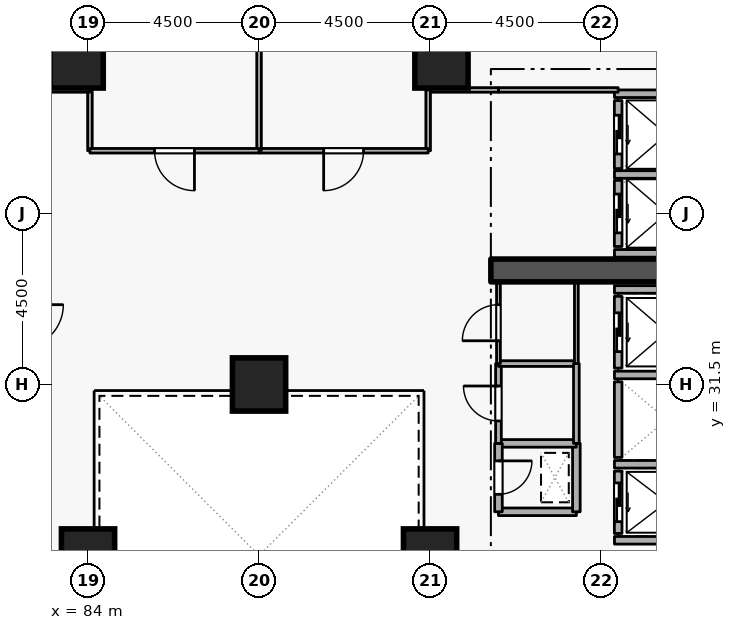
"""IFC4 building model, lengths in metres.
Left out: names, types, materials, properties, quantities, classifications, styles, units other than length and angle.
Written with IfcOpenShell. Run it as: python <this file> out.ifc"""

import sys

from ifc_helpers import new_model, si_unit, direction, frame, frame_2d, origin, origin_2d, place, context, subcontext, project, spatial, rectangle, extrude, element, fill, save


model = new_model("IFC4")
c1 = context("Model", 3, precision=1e-05, world=origin(), true_north=direction((0.0, 1.0)))
c2 = subcontext(c1, "Body", "Model", "MODEL_VIEW")
j1 = project(units=[si_unit("LENGTHUNIT", "METRE"), si_unit("PLANEANGLEUNIT", "RADIAN")], contexts=[c1])
p1 = place(None, origin())
s1 = spatial("IfcSite", under=j1, at=p1, CompositionType="ELEMENT")
p2 = place(p1, origin())
s2 = spatial("IfcBuilding", under=s1, at=p2, CompositionType="ELEMENT")
p3 = place(p2, frame((0.0, 0.0, 35.1)))
s3 = spatial("IfcBuildingStorey", under=s2, at=p3, CompositionType="ELEMENT", Elevation=35.1)
p4 = place(p3, frame((94.6, 34.5, 0.0), z_axis=(0.0, 0.0, 1.0), x_axis=(1.0, 0.0, 0.0)))
e1 = element("IfcWall", 1, at=p4, inside=s3, PredefinedType="SHEAR", context=c2, shape_type="SweptSolid", body=[
    extrude(rectangle(XDim=5.7, YDim=0.6, at=frame_2d((2.85, 0.0))), origin(), (0.0, 0.0, 1.0), 3.6),
])
for number, where, z_axis, x_axis in (
    (2, (93.3, 40.0, 0.0), (0.0, 0.0, 1.0), (1.0, 0.0, 0.0)),
    (3, (83.7, 40.0, 0.0), (0.0, 0.0, 1.0), (1.0, 0.0, 0.0)),
    (4, (93.0, 27.0, 0.0), (0.0, 0.0, 1.0), (1.0, 0.0, 0.0)),
    (5, (84.0, 27.0, 0.0), (0.0, 0.0, 1.0), (1.0, 0.0, 0.0)),
    (6, (88.5, 31.5, 0.0), (0.0, 0.0, 1.0), (1.0, 0.0, 0.0)),
):
    element("IfcColumn", number, at=place(p3, frame(where, z_axis=z_axis, x_axis=x_axis)), inside=s3, PredefinedType="COLUMN", context=c2, shape_type="SweptSolid", body=[
        extrude(rectangle(XDim=1.4, YDim=1.4, at=origin_2d()), origin(), (0.0, 0.0, 1.0), 3.6),
    ])
p5 = place(p3, frame((97.95, 29.22, 0.0), z_axis=(0.0, 0.0, 1.0), x_axis=(0.0, -1.0, 0.0)))
e7 = element("IfcWall", 7, at=p5, inside=s3, PredefinedType="STANDARD", context=c2, shape_type="SweptSolid", body=[
    extrude(rectangle(XDim=1.64, YDim=0.2, at=frame_2d((0.82, 0.0))), origin(), (0.0, 0.0, 1.0), 3.34),
])
p6 = place(p5, frame((0.31, 0.0, 0.0)))
e8 = element("IfcOpeningElement", 8, at=p6, cuts=e7, PredefinedType="OPENING", context=c2, shape_type="SweptSolid", body=[
    extrude(rectangle(XDim=1.02, YDim=2.06, at=frame_2d((0.51, 1.03))), frame((0.0, 0.11, 0.0), z_axis=(0.0, -1.0, 0.0), x_axis=(1.0, 0.0, 0.0)), (0.0, 0.0, 1.0), 0.22),
])
p7 = place(p3, frame((97.95, 31.57, 0.0), z_axis=(0.0, 0.0, 1.0), x_axis=(0.0, -1.0, 0.0)))
e9 = element("IfcWall", 9, at=p7, inside=s3, PredefinedType="STANDARD", context=c2, shape_type="SweptSolid", body=[
    extrude(rectangle(XDim=1.99, YDim=0.2, at=frame_2d((0.995, 0.0))), origin(), (0.0, 0.0, 1.0), 3.34),
])
p8 = place(p3, frame((97.95, 33.82, 0.0), z_axis=(0.0, 0.0, 1.0), x_axis=(0.0, -1.0, 0.0)))
e10 = element("IfcWall", 10, at=p8, inside=s3, PredefinedType="STANDARD", context=c2, shape_type="SweptSolid", body=[
    extrude(rectangle(XDim=1.89, YDim=0.2, at=frame_2d((0.945, 0.0))), origin(), (0.0, 0.0, 1.0), 3.34),
])
p9 = place(p8, frame((0.435, 0.0, 0.0)))
e11 = element("IfcOpeningElement", 11, at=p9, cuts=e10, PredefinedType="OPENING", context=c2, shape_type="SweptSolid", body=[
    extrude(rectangle(XDim=1.02, YDim=2.06, at=frame_2d((0.51, 1.03))), frame((0.0, 0.11, 0.0), z_axis=(0.0, -1.0, 0.0), x_axis=(1.0, 0.0, 0.0)), (0.0, 0.0, 1.0), 0.22),
])
p10 = place(p3, frame((97.95, 36.87, 0.0), z_axis=(0.0, 0.0, 1.0), x_axis=(0.0, -1.0, 0.0)))
e12 = element("IfcWall", 12, at=p10, inside=s3, PredefinedType="STANDARD", context=c2, shape_type="SweptSolid", body=[
    extrude(rectangle(XDim=1.74, YDim=0.2, at=frame_2d((0.87, 0.0))), origin(), (0.0, 0.0, 1.0), 3.34),
])
p11 = place(p10, frame((0.36, 0.0, 0.0)))
e13 = element("IfcOpeningElement", 13, at=p11, cuts=e12, PredefinedType="OPENING", context=c2, shape_type="SweptSolid", body=[
    extrude(rectangle(XDim=1.02, YDim=2.06, at=frame_2d((0.51, 1.03))), frame((0.0, 0.11, 0.0), z_axis=(0.0, -1.0, 0.0), x_axis=(1.0, 0.0, 0.0)), (0.0, 0.0, 1.0), 0.22),
])
p12 = place(p3, frame((97.95, 38.97, 0.0), z_axis=(0.0, 0.0, 1.0), x_axis=(0.0, -1.0, 0.0)))
e14 = element("IfcWall", 14, at=p12, inside=s3, PredefinedType="STANDARD", context=c2, shape_type="SweptSolid", body=[
    extrude(rectangle(XDim=1.79, YDim=0.2, at=frame_2d((0.895, 0.0))), origin(), (0.0, 0.0, 1.0), 3.34),
])
p13 = place(p12, frame((0.385, 0.0, 0.0)))
e15 = element("IfcOpeningElement", 15, at=p13, cuts=e14, PredefinedType="OPENING", context=c2, shape_type="SweptSolid", body=[
    extrude(rectangle(XDim=1.02, YDim=2.06, at=frame_2d((0.51, 1.03))), frame((0.0, 0.11, 0.0), z_axis=(0.0, -1.0, 0.0), x_axis=(1.0, 0.0, 0.0)), (0.0, 0.0, 1.0), 0.22),
])
for number, where, z_axis, x_axis in (
    (16, (97.852, 29.4, 0.0), (0.0, 0.0, 1.0), (1.0, 0.0, 0.0)),
    (17, (97.852, 27.4, 0.0), (0.0, 0.0, 1.0), (1.0, 0.0, 0.0)),
    (18, (97.852, 31.75, 0.0), (0.0, 0.0, 1.0), (1.0, 0.0, 0.0)),
    (19, (97.852, 34.0, 0.0), (0.0, 0.0, 1.0), (1.0, 0.0, 0.0)),
):
    element("IfcWall", number, at=place(p3, frame(where, z_axis=z_axis, x_axis=x_axis)), inside=s3, PredefinedType="STANDARD", context=c2, shape_type="SweptSolid", body=[
        extrude(rectangle(XDim=2.436, YDim=0.2, at=frame_2d((1.218, 0.0))), origin(), (0.0, 0.0, 1.0), 3.34),
    ])
for number, where, z_axis, x_axis in (
    (20, (97.852, 37.025, 0.0), (0.0, 0.0, 1.0), (1.0, 0.0, 0.0)),
    (21, (97.852, 34.95, 0.0), (0.0, 0.0, 1.0), (1.0, 0.0, 0.0)),
):
    element("IfcWall", number, at=place(p3, frame(where, z_axis=z_axis, x_axis=x_axis)), inside=s3, PredefinedType="STANDARD", context=c2, shape_type="SweptSolid", body=[
        extrude(rectangle(XDim=2.746, YDim=0.2, at=frame_2d((1.373, 0.0))), origin(), (0.0, 0.0, 1.0), 3.34),
    ])
p14 = place(p3, frame((97.852, 39.15, 0.0), z_axis=(0.0, 0.0, 1.0), x_axis=(1.0, 0.0, 0.0)))
e22 = element("IfcWall", 22, at=p14, inside=s3, PredefinedType="STANDARD", context=c2, shape_type="SweptSolid", body=[
    extrude(rectangle(XDim=2.636, YDim=0.2, at=frame_2d((1.318, 0.0))), origin(), (0.0, 0.0, 1.0), 3.34),
])
p15 = place(p3, frame((94.8, 28.15, 0.0), z_axis=(0.0, 0.0, 1.0), x_axis=(1.0, 0.0, 0.0)))
e23 = element("IfcWall", 23, at=p15, inside=s3, PredefinedType="STANDARD", context=c2, shape_type="SweptSolid", body=[
    extrude(rectangle(XDim=2.05, YDim=0.2, at=frame_2d((1.025, 0.0))), origin(), (0.0, 0.0, 1.0), 3.34),
])
p16 = place(p3, frame((96.85, 28.15, 0.0), z_axis=(0.0, 0.0, 1.0), x_axis=(0.0, 1.0, 0.0)))
e24 = element("IfcWall", 24, at=p16, inside=s3, PredefinedType="STANDARD", context=c2, shape_type="SweptSolid", body=[
    extrude(rectangle(XDim=1.8, YDim=0.2, at=frame_2d((0.9, 0.0))), origin(), (0.0, 0.0, 1.0), 3.34),
])
p17 = place(p3, frame((96.85, 29.95, 0.0), z_axis=(0.0, 0.0, 1.0), x_axis=(-1.0, 0.0, 0.0)))
e25 = element("IfcWall", 25, at=p17, inside=s3, PredefinedType="STANDARD", context=c2, shape_type="SweptSolid", body=[
    extrude(rectangle(XDim=2.05, YDim=0.2, at=frame_2d((1.025, 0.0))), origin(), (0.0, 0.0, 1.0), 3.34),
])
p18 = place(p3, frame((94.8, 29.95, 0.0), z_axis=(0.0, 0.0, 1.0), x_axis=(0.0, -1.0, 0.0)))
e26 = element("IfcWall", 26, at=p18, inside=s3, PredefinedType="STANDARD", context=c2, shape_type="SweptSolid", body=[
    extrude(rectangle(XDim=1.8, YDim=0.2, at=frame_2d((0.9, 0.0))), origin(), (0.0, 0.0, 1.0), 3.34),
])
p19 = place(p18, frame((0.46, 0.0, 0.0)))
e27 = element("IfcOpeningElement", 27, at=p19, cuts=e26, PredefinedType="OPENING", context=c2, shape_type="SweptSolid", body=[
    extrude(rectangle(XDim=0.88, YDim=2.04, at=frame_2d((0.44, 1.02))), frame((0.0, 0.11, 0.0), z_axis=(0.0, -1.0, 0.0), x_axis=(1.0, 0.0, 0.0)), (0.0, 0.0, 1.0), 0.22),
])
p20 = place(p3, frame((94.8, 29.95, 0.0), z_axis=(0.0, 0.0, 1.0), x_axis=(0.0, 1.0, 0.0)))
e28 = element("IfcWall", 28, at=p20, inside=s3, PredefinedType="PARTITIONING", context=c2, shape_type="SweptSolid", body=[
    extrude(rectangle(XDim=2.1, YDim=0.15, at=frame_2d((1.05, 0.0))), origin(), (0.0, 0.0, 1.0), 3.34),
])
p21 = place(p20, frame((0.59, 0.0, 0.0)))
e29 = element("IfcOpeningElement", 29, at=p21, cuts=e28, PredefinedType="OPENING", context=c2, shape_type="SweptSolid", body=[
    extrude(rectangle(XDim=0.92, YDim=2.08, at=frame_2d((0.46, 1.04))), frame((0.0, 0.085, 0.0), z_axis=(0.0, -1.0, 0.0), x_axis=(1.0, 0.0, 0.0)), (0.0, 0.0, 1.0), 0.17),
])
p22 = place(p3, frame((94.8, 32.05, 0.0), z_axis=(0.0, 0.0, 1.0), x_axis=(1.0, 0.0, 0.0)))
e30 = element("IfcWall", 30, at=p22, inside=s3, PredefinedType="PARTITIONING", context=c2, shape_type="SweptSolid", body=[
    extrude(rectangle(XDim=2.05, YDim=0.15, at=frame_2d((1.025, 0.0))), origin(), (0.0, 0.0, 1.0), 3.34),
])
p23 = place(p3, frame((96.85, 32.05, 0.0), z_axis=(0.0, 0.0, 1.0), x_axis=(0.0, -1.0, 0.0)))
e31 = element("IfcWall", 31, at=p23, inside=s3, PredefinedType="PARTITIONING", context=c2, shape_type="SweptSolid", body=[
    extrude(rectangle(XDim=2.1, YDim=0.15, at=frame_2d((1.05, 0.0))), origin(), (0.0, 0.0, 1.0), 3.34),
])
p24 = place(p3, frame((94.8, 32.05, 0.0), z_axis=(0.0, 0.0, 1.0), x_axis=(0.0, 1.0, 0.0)))
e32 = element("IfcWall", 32, at=p24, inside=s3, PredefinedType="PARTITIONING", context=c2, shape_type="SweptSolid", body=[
    extrude(rectangle(XDim=2.15, YDim=0.1, at=frame_2d((1.075, 0.0))), origin(), (0.0, 0.0, 1.0), 3.34),
])
p25 = place(p24, frame((0.6, 0.0, 0.0)))
e33 = element("IfcOpeningElement", 33, at=p25, cuts=e32, PredefinedType="OPENING", context=c2, shape_type="SweptSolid", body=[
    extrude(rectangle(XDim=0.95, YDim=2.1, at=frame_2d((0.475, 1.05))), frame((0.0, 0.06, 0.0), z_axis=(0.0, -1.0, 0.0), x_axis=(1.0, 0.0, 0.0)), (0.0, 0.0, 1.0), 0.12),
])
p26 = place(p3, frame((96.85, 34.2, 0.0), z_axis=(0.0, 0.0, 1.0), x_axis=(0.0, -1.0, 0.0)))
e34 = element("IfcWall", 34, at=p26, inside=s3, PredefinedType="PARTITIONING", context=c2, shape_type="SweptSolid", body=[
    extrude(rectangle(XDim=2.15, YDim=0.1, at=frame_2d((1.075, 0.0))), origin(), (0.0, 0.0, 1.0), 3.34),
])
p27 = place(p3, frame((97.95, 39.25, 0.0), z_axis=(0.0, 0.0, 1.0), x_axis=(-1.0, 0.0, 0.0)))
e35 = element("IfcWall", 35, at=p27, inside=s3, PredefinedType="PARTITIONING", context=c2, shape_type="SweptSolid", body=[
    extrude(rectangle(XDim=3.15, YDim=0.12, at=frame_2d((1.575, 0.0))), origin(), (0.0, 0.0, 1.0), 3.34),
])
p28 = place(p3, frame((94.8, 39.25, 0.0), z_axis=(0.0, 0.0, 1.0), x_axis=(-1.0, 0.0, 0.0)))
e36 = element("IfcWall", 36, at=p28, inside=s3, PredefinedType="PARTITIONING", context=c2, shape_type="SweptSolid", body=[
    extrude(rectangle(XDim=1.85, YDim=0.12, at=frame_2d((0.925, 0.0))), origin(), (0.0, 0.0, 1.0), 3.34),
])
p29 = place(p3, frame((92.95, 39.25, 0.0), z_axis=(0.0, 0.0, 1.0), x_axis=(0.0, -1.0, 0.0)))
e37 = element("IfcWall", 37, at=p29, inside=s3, PredefinedType="PARTITIONING", context=c2, shape_type="SweptSolid", body=[
    extrude(rectangle(XDim=1.6, YDim=0.12, at=frame_2d((0.8, 0.0))), origin(), (0.0, 0.0, 1.0), 3.34),
])
p30 = place(p3, frame((92.95, 37.65, 0.0), z_axis=(0.0, 0.0, 1.0), x_axis=(-1.0, 0.0, 0.0)))
e38 = element("IfcWall", 38, at=p30, inside=s3, PredefinedType="PARTITIONING", context=c2, shape_type="SweptSolid", body=[
    extrude(rectangle(XDim=4.45, YDim=0.12, at=frame_2d((2.225, 0.0))), origin(), (0.0, 0.0, 1.0), 3.34),
])
p31 = place(p30, frame((1.7, 0.0, 0.0)))
e39 = element("IfcOpeningElement", 39, at=p31, cuts=e38, PredefinedType="OPENING", context=c2, shape_type="SweptSolid", body=[
    extrude(rectangle(XDim=1.05, YDim=2.1, at=frame_2d((0.525, 1.05))), frame((0.0, 0.07, 0.0), z_axis=(0.0, -1.0, 0.0), x_axis=(1.0, 0.0, 0.0)), (0.0, 0.0, 1.0), 0.14),
])
p32 = place(p3, frame((88.5, 37.65, 0.0), z_axis=(0.0, 0.0, 1.0), x_axis=(0.0, 1.0, 0.0)))
e40 = element("IfcWall", 40, at=p32, inside=s3, PredefinedType="PARTITIONING", context=c2, shape_type="SweptSolid", body=[
    extrude(rectangle(XDim=7.57, YDim=0.12, at=frame_2d((3.785, 0.0))), origin(), (0.0, 0.0, 1.0), 2.878),
])
p33 = place(p3, frame((84.05, 37.65, 0.0), z_axis=(0.0, 0.0, 1.0), x_axis=(0.0, 1.0, 0.0)))
e41 = element("IfcWall", 41, at=p33, inside=s3, PredefinedType="PARTITIONING", context=c2, shape_type="SweptSolid", body=[
    extrude(rectangle(XDim=1.6, YDim=0.12, at=frame_2d((0.8, 0.0))), origin(), (0.0, 0.0, 1.0), 3.34),
])
p34 = place(p3, frame((84.05, 39.25, 0.0), z_axis=(0.0, 0.0, 1.0), x_axis=(-1.0, 0.0, 0.0)))
e42 = element("IfcWall", 42, at=p34, inside=s3, PredefinedType="PARTITIONING", context=c2, shape_type="SweptSolid", body=[
    extrude(rectangle(XDim=1.85, YDim=0.12, at=frame_2d((0.925, 0.0))), origin(), (0.0, 0.0, 1.0), 3.34),
])
p35 = place(p3, frame((88.5, 37.65, 0.0), z_axis=(0.0, 0.0, 1.0), x_axis=(-1.0, 0.0, 0.0)))
e43 = element("IfcWall", 43, at=p35, inside=s3, PredefinedType="PARTITIONING", context=c2, shape_type="SweptSolid", body=[
    extrude(rectangle(XDim=4.45, YDim=0.12, at=frame_2d((2.225, 0.0))), origin(), (0.0, 0.0, 1.0), 3.34),
])
p36 = place(p35, frame((1.7, 0.0, 0.0)))
e44 = element("IfcOpeningElement", 44, at=p36, cuts=e43, PredefinedType="OPENING", context=c2, shape_type="SweptSolid", body=[
    extrude(rectangle(XDim=1.05, YDim=2.1, at=frame_2d((0.525, 1.05))), frame((0.0, 0.07, 0.0), z_axis=(0.0, -1.0, 0.0), x_axis=(1.0, 0.0, 0.0)), (0.0, 0.0, 1.0), 0.14),
])
p37 = place(p6, origin())
e45 = element("IfcDoor", 45, at=p37, inside=s3, OperationType="SLIDING_TO_LEFT", PredefinedType="DOOR", context=c2, shape_type="SweptSolid", body=[
    extrude(rectangle(XDim=1.02, YDim=2.06, at=frame_2d((0.51, 1.03))), frame((0.0, 0.025, 0.0), z_axis=(0.0, -1.0, 0.0), x_axis=(1.0, 0.0, 0.0)), (0.0, 0.0, 1.0), 0.05),
])
fill(e8, e45)
p38 = place(p9, origin())
e46 = element("IfcDoor", 46, at=p38, inside=s3, OperationType="SLIDING_TO_LEFT", PredefinedType="DOOR", context=c2, shape_type="SweptSolid", body=[
    extrude(rectangle(XDim=1.02, YDim=2.06, at=frame_2d((0.51, 1.03))), frame((0.0, 0.025, 0.0), z_axis=(0.0, -1.0, 0.0), x_axis=(1.0, 0.0, 0.0)), (0.0, 0.0, 1.0), 0.05),
])
fill(e11, e46)
p39 = place(p11, origin())
e47 = element("IfcDoor", 47, at=p39, inside=s3, OperationType="SLIDING_TO_LEFT", PredefinedType="DOOR", context=c2, shape_type="SweptSolid", body=[
    extrude(rectangle(XDim=1.02, YDim=2.06, at=frame_2d((0.51, 1.03))), frame((0.0, 0.025, 0.0), z_axis=(0.0, -1.0, 0.0), x_axis=(1.0, 0.0, 0.0)), (0.0, 0.0, 1.0), 0.05),
])
fill(e13, e47)
p40 = place(p13, origin())
e48 = element("IfcDoor", 48, at=p40, inside=s3, OperationType="SLIDING_TO_LEFT", PredefinedType="DOOR", context=c2, shape_type="SweptSolid", body=[
    extrude(rectangle(XDim=1.02, YDim=2.06, at=frame_2d((0.51, 1.03))), frame((0.0, 0.025, 0.0), z_axis=(0.0, -1.0, 0.0), x_axis=(1.0, 0.0, 0.0)), (0.0, 0.0, 1.0), 0.05),
])
fill(e15, e48)
p41 = place(p19, origin())
e49 = element("IfcDoor", 49, at=p41, inside=s3, OperationType="SINGLE_SWING_LEFT", PredefinedType="DOOR", context=c2, shape_type="SweptSolid", body=[
    extrude(rectangle(XDim=0.88, YDim=2.04, at=frame_2d((0.44, 1.02))), frame((0.0, 0.025, 0.0), z_axis=(0.0, -1.0, 0.0), x_axis=(1.0, 0.0, 0.0)), (0.0, 0.0, 1.0), 0.05),
])
fill(e27, e49)
p42 = place(p21, origin())
e50 = element("IfcDoor", 50, at=p42, inside=s3, OperationType="SINGLE_SWING_RIGHT", PredefinedType="DOOR", context=c2, shape_type="SweptSolid", body=[
    extrude(rectangle(XDim=0.92, YDim=2.08, at=frame_2d((0.46, 1.04))), frame((0.0, 0.025, 0.0), z_axis=(0.0, -1.0, 0.0), x_axis=(1.0, 0.0, 0.0)), (0.0, 0.0, 1.0), 0.05),
])
fill(e29, e50)
p43 = place(p25, origin())
e51 = element("IfcDoor", 51, at=p43, inside=s3, OperationType="SINGLE_SWING_LEFT", PredefinedType="DOOR", context=c2, shape_type="SweptSolid", body=[
    extrude(rectangle(XDim=0.95, YDim=2.1, at=frame_2d((0.475, 1.05))), frame((0.0, 0.025, 0.0), z_axis=(0.0, -1.0, 0.0), x_axis=(1.0, 0.0, 0.0)), (0.0, 0.0, 1.0), 0.05),
])
fill(e33, e51)
p44 = place(p31, origin())
e52 = element("IfcDoor", 52, at=p44, inside=s3, OperationType="SINGLE_SWING_RIGHT", PredefinedType="DOOR", context=c2, shape_type="SweptSolid", body=[
    extrude(rectangle(XDim=1.05, YDim=2.1, at=frame_2d((0.525, 1.05))), frame((0.0, 0.025, 0.0), z_axis=(0.0, -1.0, 0.0), x_axis=(1.0, 0.0, 0.0)), (0.0, 0.0, 1.0), 0.05),
])
fill(e39, e52)
p45 = place(p36, origin())
e53 = element("IfcDoor", 53, at=p45, inside=s3, OperationType="SINGLE_SWING_LEFT", PredefinedType="DOOR", context=c2, shape_type="SweptSolid", body=[
    extrude(rectangle(XDim=1.05, YDim=2.1, at=frame_2d((0.525, 1.05))), frame((0.0, 0.025, 0.0), z_axis=(0.0, -1.0, 0.0), x_axis=(1.0, 0.0, 0.0)), (0.0, 0.0, 1.0), 0.05),
])
fill(e44, e53)
save(model, sys.argv[1])
